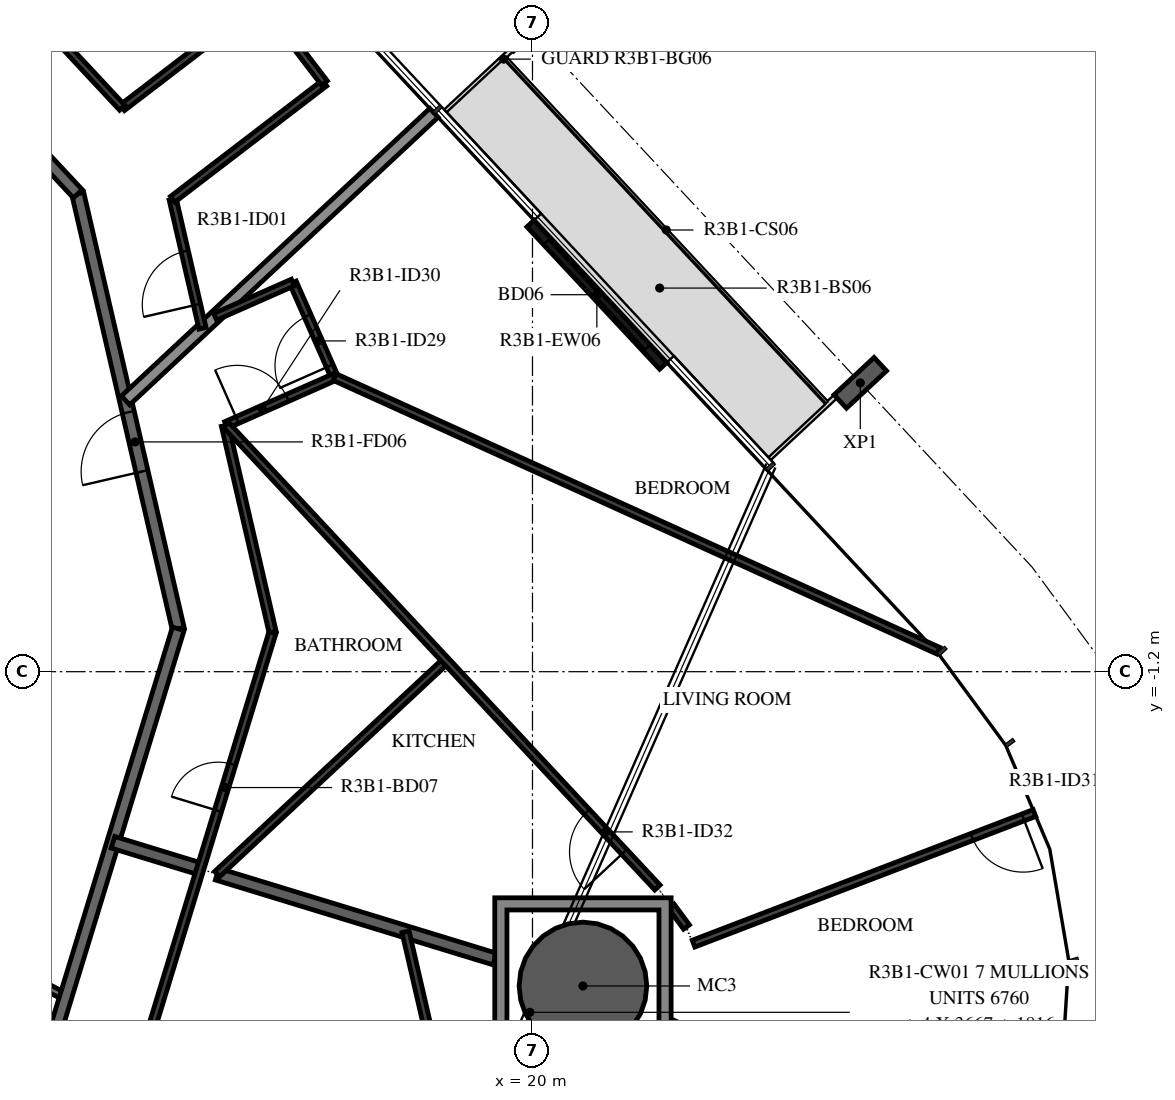
"""IFC4 building model, lengths in metres.
Left out: names, types, materials, properties, quantities, classifications, styles, units other than length and angle.
Written with IfcOpenShell. Run it as: python <this file> out.ifc"""

import sys

from ifc_helpers import new_model, si_unit, direction, frame, frame_2d, origin, origin_2d, place, context, subcontext, project, spatial, polyline, rectangle, hollow_circle, i_section, outline, extrude, element, fill, save


model = new_model("IFC4")
c1 = context("Model", 3, precision=1e-05, world=origin(), true_north=direction((0.0, 1.0)))
c2 = subcontext(c1, "Body", "Model", "MODEL_VIEW")
j1 = project(units=[si_unit("LENGTHUNIT", "METRE"), si_unit("PLANEANGLEUNIT", "RADIAN")], contexts=[c1])
p1 = place(None, origin())
s1 = spatial("IfcSite", under=j1, at=p1, CompositionType="ELEMENT")
p2 = place(p1, origin())
s2 = spatial("IfcBuilding", under=s1, at=p2, CompositionType="ELEMENT")
p3 = place(p2, frame((0.0, 0.0, 123.9)))
s3 = spatial("IfcBuildingStorey", under=s2, at=p3, CompositionType="ELEMENT", Elevation=123.9)
p4 = place(p3, frame((20.83, -6.368, -0.38), z_axis=(0.0, 0.0, 1.0), x_axis=(1.0, 0.0, 0.0)))
e1 = element("IfcColumn", 1, at=p4, inside=s3, PredefinedType="COLUMN", context=c2, shape_type="SweptSolid", body=[
    extrude(hollow_circle(Radius=1.05, WallThickness=0.05, at=origin_2d()), origin(), (0.0, 0.0, 1.0), 3.5),
])
p5 = place(p3, frame((25.391, 3.55, -0.38), z_axis=(0.0, 0.0, 1.0), x_axis=(0.68199801865, -0.731354019992, 0.0)))
e2 = element("IfcColumn", 2, at=p5, inside=s3, PredefinedType="COLUMN", context=c2, shape_type="SweptSolid", body=[
    extrude(i_section(OverallWidth=0.3, OverallDepth=0.9, WebThickness=0.019, FlangeThickness=0.035, FilletRadius=0.03, at=origin_2d()), origin(), (0.0, 0.0, 1.0), 3.5),
])
p6 = place(p3, frame((22.15, 3.829, 0.0), z_axis=(0.0, 0.0, 1.0), x_axis=(-0.682035508355, 0.731319058512, 0.0)))
e3 = element("IfcWall", 3, at=p6, inside=s3, PredefinedType="STANDARD", context=c2, shape_type="SweptSolid", body=[
    extrude(rectangle(XDim=3.2, YDim=0.16, at=frame_2d((1.6, 0.0))), origin(), (0.0, 0.0, 1.0), 3.12),
])
p7 = place(p6, frame((0.4, 0.0, 0.0)))
e4 = element("IfcOpeningElement", 4, at=p7, cuts=e3, PredefinedType="OPENING", context=c2, shape_type="SweptSolid", body=[
    extrude(rectangle(XDim=2.4, YDim=2.4, at=frame_2d((1.2, 1.2))), frame((0.0, 0.09, 0.0), z_axis=(0.0, -1.0, 0.0), x_axis=(1.0, 0.0, 0.0)), (0.0, 0.0, 1.0), 0.18),
])
p8 = place(p3, frame((10.511, -5.589, 0.0), z_axis=(0.0, 0.0, 1.0), x_axis=(0.882987820808, -0.469395897196, 0.0)))
e5 = element("IfcWall", 5, at=p8, inside=s3, PredefinedType="PARTITIONING", context=c2, shape_type="SweptSolid", body=[
    extrude(rectangle(XDim=2.052, YDim=0.12, at=frame_2d((1.026, 0.0))), origin(), (0.0, 0.0, 1.0), 3.12),
])
p9 = place(p8, frame((0.1, 0.0, 0.0)))
e6 = element("IfcOpeningElement", 6, at=p9, cuts=e5, PredefinedType="OPENING", context=c2, shape_type="SweptSolid", body=[
    extrude(rectangle(XDim=1.2, YDim=2.1, at=frame_2d((0.6, 1.05))), frame((0.0, 0.07, 0.0), z_axis=(0.0, -1.0, 0.0), x_axis=(1.0, 0.0, 0.0)), (0.0, 0.0, 1.0), 0.14),
])
p10 = place(p3, frame((14.175, -0.495, 0.0), z_axis=(0.0, 0.0, 1.0), x_axis=(-0.224922649383, 0.974376622151, 0.0)))
e7 = element("IfcWall", 7, at=p10, inside=s3, PredefinedType="STANDARD", context=c2, shape_type="SweptSolid", body=[
    extrude(rectangle(XDim=7.342, YDim=0.2, at=frame_2d((3.671, 0.0))), origin(), (0.0, 0.0, 1.0), 3.12),
])
p11 = place(p10, frame((2.655, 0.0, 0.0)))
e8 = element("IfcOpeningElement", 8, at=p11, cuts=e7, PredefinedType="OPENING", context=c2, shape_type="SweptSolid", body=[
    extrude(rectangle(XDim=1.0, YDim=2.1, at=frame_2d((0.5, 1.05))), frame((0.0, 0.11, 0.0), z_axis=(0.0, -1.0, 0.0), x_axis=(1.0, 0.0, 0.0)), (0.0, 0.0, 1.0), 0.22),
])
p12 = place(p3, frame((12.523, 6.659, 0.0), z_axis=(0.0, 0.0, 1.0), x_axis=(-0.682001841105, 0.731350455479, 0.0)))
e9 = element("IfcWall", 9, at=p12, inside=s3, PredefinedType="STANDARD", context=c2, shape_type="SweptSolid", body=[
    extrude(rectangle(XDim=7.342, YDim=0.2, at=frame_2d((3.671, 0.0))), origin(), (0.0, 0.0, 1.0), 3.12),
])
p13 = place(p12, frame((3.2, 0.0, 0.0)))
e10 = element("IfcOpeningElement", 10, at=p13, cuts=e9, PredefinedType="OPENING", context=c2, shape_type="SweptSolid", body=[
    extrude(rectangle(XDim=1.0, YDim=2.1, at=frame_2d((0.5, 1.05))), frame((0.0, 0.11, 0.0), z_axis=(0.0, -1.0, 0.0), x_axis=(1.0, 0.0, 0.0)), (0.0, 0.0, 1.0), 0.22),
])
p14 = place(p3, frame((12.028, -7.516, 0.0), z_axis=(0.0, 0.0, 1.0), x_axis=(0.292365533182, 0.956306642771, 0.0)))
e11 = element("IfcWall", 11, at=p14, inside=s3, PredefinedType="STANDARD", context=c2, shape_type="SweptSolid", body=[
    extrude(rectangle(XDim=7.342, YDim=0.2, at=frame_2d((3.671, 0.0))), origin(), (0.0, 0.0, 1.0), 3.12),
])
p15 = place(p3, frame((13.308, 3.261, 0.0), z_axis=(0.0, 0.0, 1.0), x_axis=(0.731356087831, 0.681995801154, 0.0)))
e12 = element("IfcWall", 12, at=p15, inside=s3, PredefinedType="STANDARD", context=c2, shape_type="SweptSolid", body=[
    extrude(rectangle(XDim=6.934, YDim=0.2, at=frame_2d((3.467, 0.0))), origin(), (0.0, 0.0, 1.0), 2.73),
])
p16 = place(p3, frame((14.536, -4.444, 0.0), z_axis=(0.0, 0.0, 1.0), x_axis=(-0.956326299111, 0.292301230974, 0.0)))
e13 = element("IfcWall", 13, at=p16, inside=s3, PredefinedType="STANDARD", context=c2, shape_type="SweptSolid", body=[
    extrude(rectangle(XDim=1.5, YDim=0.2, at=frame_2d((0.75, 0.0))), origin(), (0.0, 0.0, 1.0), 3.12),
])
p17 = place(p3, frame((19.38, -5.925, 0.0), z_axis=(0.0, 0.0, 1.0), x_axis=(-0.956301542054, 0.29238221674, 0.0)))
e14 = element("IfcWall", 14, at=p17, inside=s3, PredefinedType="STANDARD", context=c2, shape_type="SweptSolid", body=[
    extrude(rectangle(XDim=4.775, YDim=0.2, at=frame_2d((2.387, 0.0))), origin(), (0.0, 0.0, 1.0), 3.12),
])
p18 = place(p3, frame((14.573, 4.447, 0.0), z_axis=(0.0, 0.0, 1.0), x_axis=(-0.225006886074, 0.97435717333, 0.0)))
e15 = element("IfcWall", 15, at=p18, inside=s3, PredefinedType="PARTITIONING", context=c2, shape_type="SweptSolid", body=[
    extrude(rectangle(XDim=2.178, YDim=0.12, at=frame_2d((1.089, 0.0))), origin(), (0.0, 0.0, 1.0), 3.12),
])
p19 = place(p18, frame((0.4, 0.0, 0.0)))
e16 = element("IfcOpeningElement", 16, at=p19, cuts=e15, PredefinedType="OPENING", context=c2, shape_type="SweptSolid", body=[
    extrude(rectangle(XDim=0.9, YDim=2.1, at=frame_2d((0.45, 1.05))), frame((0.0, 0.07, 0.0), z_axis=(0.0, -1.0, 0.0), x_axis=(1.0, 0.0, 0.0)), (0.0, 0.0, 1.0), 0.14),
])
p20 = place(p3, frame((14.083, 6.569, 0.0), z_axis=(0.0, 0.0, 1.0), x_axis=(0.794099847012, 0.607787325449, 0.0)))
e17 = element("IfcWall", 17, at=p20, inside=s3, PredefinedType="PARTITIONING", context=c2, shape_type="SweptSolid", body=[
    extrude(rectangle(XDim=3.144, YDim=0.12, at=frame_2d((1.572, 0.0))), origin(), (0.0, 0.0, 1.0), 3.12),
])
p21 = place(p3, frame((16.58, 8.479, 0.0), z_axis=(0.0, 0.0, 1.0), x_axis=(-0.607897770777, 0.794015302298, 0.0)))
e18 = element("IfcWall", 18, at=p21, inside=s3, PredefinedType="PARTITIONING", context=c2, shape_type="SweptSolid", body=[
    extrude(rectangle(XDim=1.7, YDim=0.12, at=frame_2d((0.85, 0.0))), origin(), (0.0, 0.0, 1.0), 3.12),
])
p22 = place(p3, frame((15.546, 9.829, 0.0), z_axis=(0.0, 0.0, 1.0), x_axis=(-0.794096114645, -0.607792201912, 0.0)))
e19 = element("IfcWall", 19, at=p22, inside=s3, PredefinedType="PARTITIONING", context=c2, shape_type="SweptSolid", body=[
    extrude(rectangle(XDim=2.887, YDim=0.12, at=frame_2d((1.443, 0.0))), origin(), (0.0, 0.0, 1.0), 3.12),
])
p23 = place(p3, frame((13.254, 8.075, 0.0), z_axis=(0.0, 0.0, 1.0), x_axis=(-0.681995901471, 0.731355994285, 0.0)))
e20 = element("IfcWall", 20, at=p23, inside=s3, PredefinedType="PARTITIONING", context=c2, shape_type="SweptSolid", body=[
    extrude(rectangle(XDim=7.207, YDim=0.12, at=frame_2d((3.603, 0.0))), origin(), (0.0, 0.0, 1.0), 3.12),
])
p24 = place(p23, frame((4.672, 0.0, 0.0)))
e21 = element("IfcOpeningElement", 21, at=p24, cuts=e20, PredefinedType="OPENING", context=c2, shape_type="SweptSolid", body=[
    extrude(rectangle(XDim=0.9, YDim=2.1, at=frame_2d((0.45, 1.05))), frame((0.0, 0.07, 0.0), z_axis=(0.0, -1.0, 0.0), x_axis=(1.0, 0.0, 0.0)), (0.0, 0.0, 1.0), 0.14),
])
p25 = place(p3, frame((13.7, -7.177, 0.0), z_axis=(0.0, 0.0, 1.0), x_axis=(0.292382309758, 0.956301513614, 0.0)))
e22 = element("IfcWall", 22, at=p25, inside=s3, PredefinedType="PARTITIONING", context=c2, shape_type="SweptSolid", body=[
    extrude(rectangle(XDim=6.93, YDim=0.12, at=frame_2d((3.465, 0.0))), origin(), (0.0, 0.0, 1.0), 3.12),
])
p26 = place(p25, frame((3.858, 0.0, 0.0)))
e23 = element("IfcOpeningElement", 23, at=p26, cuts=e22, PredefinedType="OPENING", context=c2, shape_type="SweptSolid", body=[
    extrude(rectangle(XDim=0.8, YDim=2.1, at=frame_2d((0.4, 1.05))), frame((0.0, 0.07, 0.0), z_axis=(0.0, -1.0, 0.0), x_axis=(1.0, 0.0, 0.0)), (0.0, 0.0, 1.0), 0.14),
])
p27 = place(p3, frame((19.245, -11.25, 0.0), z_axis=(0.0, 0.0, 1.0), x_axis=(-0.224958805164, 0.974368275335, 0.0)))
e24 = element("IfcWall", 24, at=p27, inside=s3, PredefinedType="PARTITIONING", context=c2, shape_type="SweptSolid", body=[
    extrude(rectangle(XDim=5.926, YDim=0.12, at=frame_2d((2.963, 0.0))), origin(), (0.0, 0.0, 1.0), 3.12),
])
p28 = place(p27, frame((0.2, 0.0, 0.0)))
e25 = element("IfcOpeningElement", 25, at=p28, cuts=e24, PredefinedType="OPENING", context=c2, shape_type="SweptSolid", body=[
    extrude(rectangle(XDim=0.9, YDim=2.1, at=frame_2d((0.45, 1.05))), frame((0.0, 0.07, 0.0), z_axis=(0.0, -1.0, 0.0), x_axis=(1.0, 0.0, 0.0)), (0.0, 0.0, 1.0), 0.14),
])
p29 = place(p3, frame((16.747, 3.645, 0.0), z_axis=(0.0, 0.0, 1.0), x_axis=(-0.40401852801, 0.914750801598, 0.0)))
e26 = element("IfcWall", 26, at=p29, inside=s3, PredefinedType="PARTITIONING", context=c2, shape_type="SweptSolid", body=[
    extrude(rectangle(XDim=1.7, YDim=0.12, at=frame_2d((0.85, 0.0))), origin(), (0.0, 0.0, 1.0), 3.12),
])
p30 = place(p29, frame((0.2, 0.0, 0.0)))
e27 = element("IfcOpeningElement", 27, at=p30, cuts=e26, PredefinedType="OPENING", context=c2, shape_type="SweptSolid", body=[
    extrude(rectangle(XDim=0.9, YDim=2.1, at=frame_2d((0.45, 1.05))), frame((0.0, 0.07, 0.0), z_axis=(0.0, -1.0, 0.0), x_axis=(1.0, 0.0, 0.0)), (0.0, 0.0, 1.0), 0.14),
])
p31 = place(p3, frame((16.06, 5.2, 0.0), z_axis=(0.0, 0.0, 1.0), x_axis=(-0.91479626238, -0.403915583179, 0.0)))
e28 = element("IfcWall", 28, at=p31, inside=s3, PredefinedType="PARTITIONING", context=c2, shape_type="SweptSolid", body=[
    extrude(rectangle(XDim=1.397, YDim=0.12, at=frame_2d((0.698, 0.0))), origin(), (0.0, 0.0, 1.0), 3.12),
])
p32 = place(p3, frame((15.727, -0.549, 0.0), z_axis=(0.0, 0.0, 1.0), x_axis=(-0.224900416367, 0.974381754097, 0.0)))
e29 = element("IfcWall", 29, at=p32, inside=s3, PredefinedType="PARTITIONING", context=c2, shape_type="SweptSolid", body=[
    extrude(rectangle(XDim=3.487, YDim=0.12, at=frame_2d((1.743, 0.0))), origin(), (0.0, 0.0, 1.0), 3.12),
])
p33 = place(p3, frame((14.962, 2.857, 0.0), z_axis=(0.0, 0.0, 1.0), x_axis=(0.914732858216, 0.404059151734, 0.0)))
e30 = element("IfcWall", 30, at=p33, inside=s3, PredefinedType="PARTITIONING", context=c2, shape_type="SweptSolid", body=[
    extrude(rectangle(XDim=1.951, YDim=0.12, at=frame_2d((0.976, 0.0))), origin(), (0.0, 0.0, 1.0), 3.12),
])
p34 = place(p33, frame((0.2, 0.0, 0.0)))
e31 = element("IfcOpeningElement", 31, at=p34, cuts=e30, PredefinedType="OPENING", context=c2, shape_type="SweptSolid", body=[
    extrude(rectangle(XDim=0.9, YDim=2.1, at=frame_2d((0.45, 1.05))), frame((0.0, 0.07, 0.0), z_axis=(0.0, -1.0, 0.0), x_axis=(1.0, 0.0, 0.0)), (0.0, 0.0, 1.0), 0.14),
])
p35 = place(p3, frame((16.747, 3.645, 0.0), z_axis=(0.0, 0.0, 1.0), x_axis=(0.910796273175, -0.412856087238, 0.0)))
e32 = element("IfcWall", 32, at=p35, inside=s3, PredefinedType="PARTITIONING", context=c2, shape_type="SweptSolid", body=[
    extrude(rectangle(XDim=10.901, YDim=0.12, at=frame_2d((5.45, 0.0))), origin(), (0.0, 0.0, 1.0), 3.12),
])
p36 = place(p3, frame((28.255, -3.525, 0.0), z_axis=(0.0, 0.0, 1.0), x_axis=(-0.933839412031, -0.357692539114, 0.0)))
e33 = element("IfcWall", 33, at=p36, inside=s3, PredefinedType="PARTITIONING", context=c2, shape_type="SweptSolid", body=[
    extrude(rectangle(XDim=6.004, YDim=0.12, at=frame_2d((3.002, 0.0))), origin(), (0.0, 0.0, 1.0), 2.73),
])
p37 = place(p36, frame((0.2, 0.0, 0.0)))
e34 = element("IfcOpeningElement", 34, at=p37, cuts=e33, PredefinedType="OPENING", context=c2, shape_type="SweptSolid", body=[
    extrude(rectangle(XDim=0.9, YDim=2.1, at=frame_2d((0.45, 1.05))), frame((0.0, 0.07, 0.0), z_axis=(0.0, -1.0, 0.0), x_axis=(1.0, 0.0, 0.0)), (0.0, 0.0, 1.0), 0.14),
])
p38 = place(p3, frame((22.532, -5.399, 0.0), z_axis=(0.0, 0.0, 1.0), x_axis=(-0.592456078431, 0.805602752683, 0.0)))
e35 = element("IfcWall", 35, at=p38, inside=s3, PredefinedType="PARTITIONING", context=c2, shape_type="SweptSolid", body=[
    extrude(rectangle(XDim=0.426, YDim=0.12, at=frame_2d((0.213, 0.0))), origin(), (0.0, 0.0, 1.0), 3.12),
])
p39 = place(p3, frame((18.577, -1.02, 0.0), z_axis=(0.0, 0.0, 1.0), x_axis=(-0.731348673524, -0.682003751994, 0.0)))
e36 = element("IfcWall", 36, at=p39, inside=s3, PredefinedType="PARTITIONING", context=c2, shape_type="SweptSolid", body=[
    extrude(rectangle(XDim=5.146, YDim=0.12, at=frame_2d((2.573, 0.0))), origin(), (0.0, 0.0, 1.0), 3.12),
])
p40 = place(p3, frame((22.054, -4.749, 0.0), z_axis=(0.0, 0.0, 1.0), x_axis=(-0.682014558945, 0.731338595582, 0.0)))
e37 = element("IfcWall", 37, at=p40, inside=s3, PredefinedType="PARTITIONING", context=c2, shape_type="SweptSolid", body=[
    extrude(rectangle(XDim=10.399, YDim=0.12, at=frame_2d((5.2, 0.0))), origin(), (0.0, 0.0, 1.0), 3.12),
])
p41 = place(p40, frame((0.8, 0.0, 0.0)))
e38 = element("IfcOpeningElement", 38, at=p41, cuts=e37, PredefinedType="OPENING", context=c2, shape_type="SweptSolid", body=[
    extrude(rectangle(XDim=0.9, YDim=2.1, at=frame_2d((0.45, 1.05))), frame((0.0, 0.07, 0.0), z_axis=(0.0, -1.0, 0.0), x_axis=(1.0, 0.0, 0.0)), (0.0, 0.0, 1.0), 0.14),
])
p42 = place(p3, origin())
e39 = element("IfcWall", 39, at=p42, inside=s3, PredefinedType="STANDARD", context=c2, shape_type="SweptSolid", body=[
    extrude(outline(polyline([(22.28, -4.918), (22.28, -7.818), (19.38, -7.818), (19.38, -4.918), (22.28, -4.918)]), holes=[polyline([(19.58, -7.618), (22.08, -7.618), (22.08, -5.118), (19.58, -5.118), (19.58, -7.618)])]), origin(), (0.0, 0.0, 1.0), 3.12),
])
p43 = place(p7, origin())
e40 = element("IfcDoor", 40, at=p43, inside=s3, OperationType="DOUBLE_DOOR_SLIDING", PredefinedType="DOOR", context=c2, shape_type="SweptSolid", body=[
    extrude(rectangle(XDim=2.4, YDim=2.4, at=frame_2d((1.2, 1.2))), frame((0.0, 0.025, 0.0), z_axis=(0.0, -1.0, 0.0), x_axis=(1.0, 0.0, 0.0)), (0.0, 0.0, 1.0), 0.05),
])
fill(e4, e40)
p44 = place(p19, origin())
e41 = element("IfcDoor", 41, at=p44, inside=s3, OperationType="SINGLE_SWING_LEFT", PredefinedType="DOOR", context=c2, shape_type="SweptSolid", body=[
    extrude(rectangle(XDim=0.9, YDim=2.1, at=frame_2d((0.45, 1.05))), frame((0.0, 0.025, 0.0), z_axis=(0.0, -1.0, 0.0), x_axis=(1.0, 0.0, 0.0)), (0.0, 0.0, 1.0), 0.05),
])
fill(e16, e41)
p45 = place(p11, origin())
e42 = element("IfcDoor", 42, at=p45, inside=s3, OperationType="SINGLE_SWING_LEFT", PredefinedType="DOOR", context=c2, shape_type="SweptSolid", body=[
    extrude(rectangle(XDim=1.0, YDim=2.1, at=frame_2d((0.5, 1.05))), frame((0.0, 0.025, 0.0), z_axis=(0.0, -1.0, 0.0), x_axis=(1.0, 0.0, 0.0)), (0.0, 0.0, 1.0), 0.05),
])
fill(e8, e42)
p46 = place(p30, origin())
e43 = element("IfcDoor", 43, at=p46, inside=s3, OperationType="SINGLE_SWING_LEFT", PredefinedType="DOOR", context=c2, shape_type="SweptSolid", body=[
    extrude(rectangle(XDim=0.9, YDim=2.1, at=frame_2d((0.45, 1.05))), frame((0.0, 0.025, 0.0), z_axis=(0.0, -1.0, 0.0), x_axis=(1.0, 0.0, 0.0)), (0.0, 0.0, 1.0), 0.05),
])
fill(e27, e43)
p47 = place(p26, origin())
e44 = element("IfcDoor", 44, at=p47, inside=s3, OperationType="SINGLE_SWING_LEFT", PredefinedType="DOOR", context=c2, shape_type="SweptSolid", body=[
    extrude(rectangle(XDim=0.8, YDim=2.1, at=frame_2d((0.4, 1.05))), frame((0.0, 0.025, 0.0), z_axis=(0.0, -1.0, 0.0), x_axis=(1.0, 0.0, 0.0)), (0.0, 0.0, 1.0), 0.05),
])
fill(e23, e44)
p48 = place(p34, origin())
e45 = element("IfcDoor", 45, at=p48, inside=s3, OperationType="SINGLE_SWING_RIGHT", PredefinedType="DOOR", context=c2, shape_type="SweptSolid", body=[
    extrude(rectangle(XDim=0.9, YDim=2.1, at=frame_2d((0.45, 1.05))), frame((0.0, 0.025, 0.0), z_axis=(0.0, -1.0, 0.0), x_axis=(1.0, 0.0, 0.0)), (0.0, 0.0, 1.0), 0.05),
])
fill(e31, e45)
p49 = place(p37, origin())
e46 = element("IfcDoor", 46, at=p49, inside=s3, OperationType="SINGLE_SWING_LEFT", PredefinedType="DOOR", context=c2, shape_type="SweptSolid", body=[
    extrude(rectangle(XDim=0.9, YDim=2.1, at=frame_2d((0.45, 1.05))), frame((0.0, 0.025, 0.0), z_axis=(0.0, -1.0, 0.0), x_axis=(1.0, 0.0, 0.0)), (0.0, 0.0, 1.0), 0.05),
])
fill(e34, e46)
p50 = place(p41, origin())
e47 = element("IfcDoor", 47, at=p50, inside=s3, OperationType="SINGLE_SWING_RIGHT", PredefinedType="DOOR", context=c2, shape_type="SweptSolid", body=[
    extrude(rectangle(XDim=0.9, YDim=2.1, at=frame_2d((0.45, 1.05))), frame((0.0, 0.025, 0.0), z_axis=(0.0, -1.0, 0.0), x_axis=(1.0, 0.0, 0.0)), (0.0, 0.0, 1.0), 0.05),
])
fill(e38, e47)
save(model, sys.argv[1])
